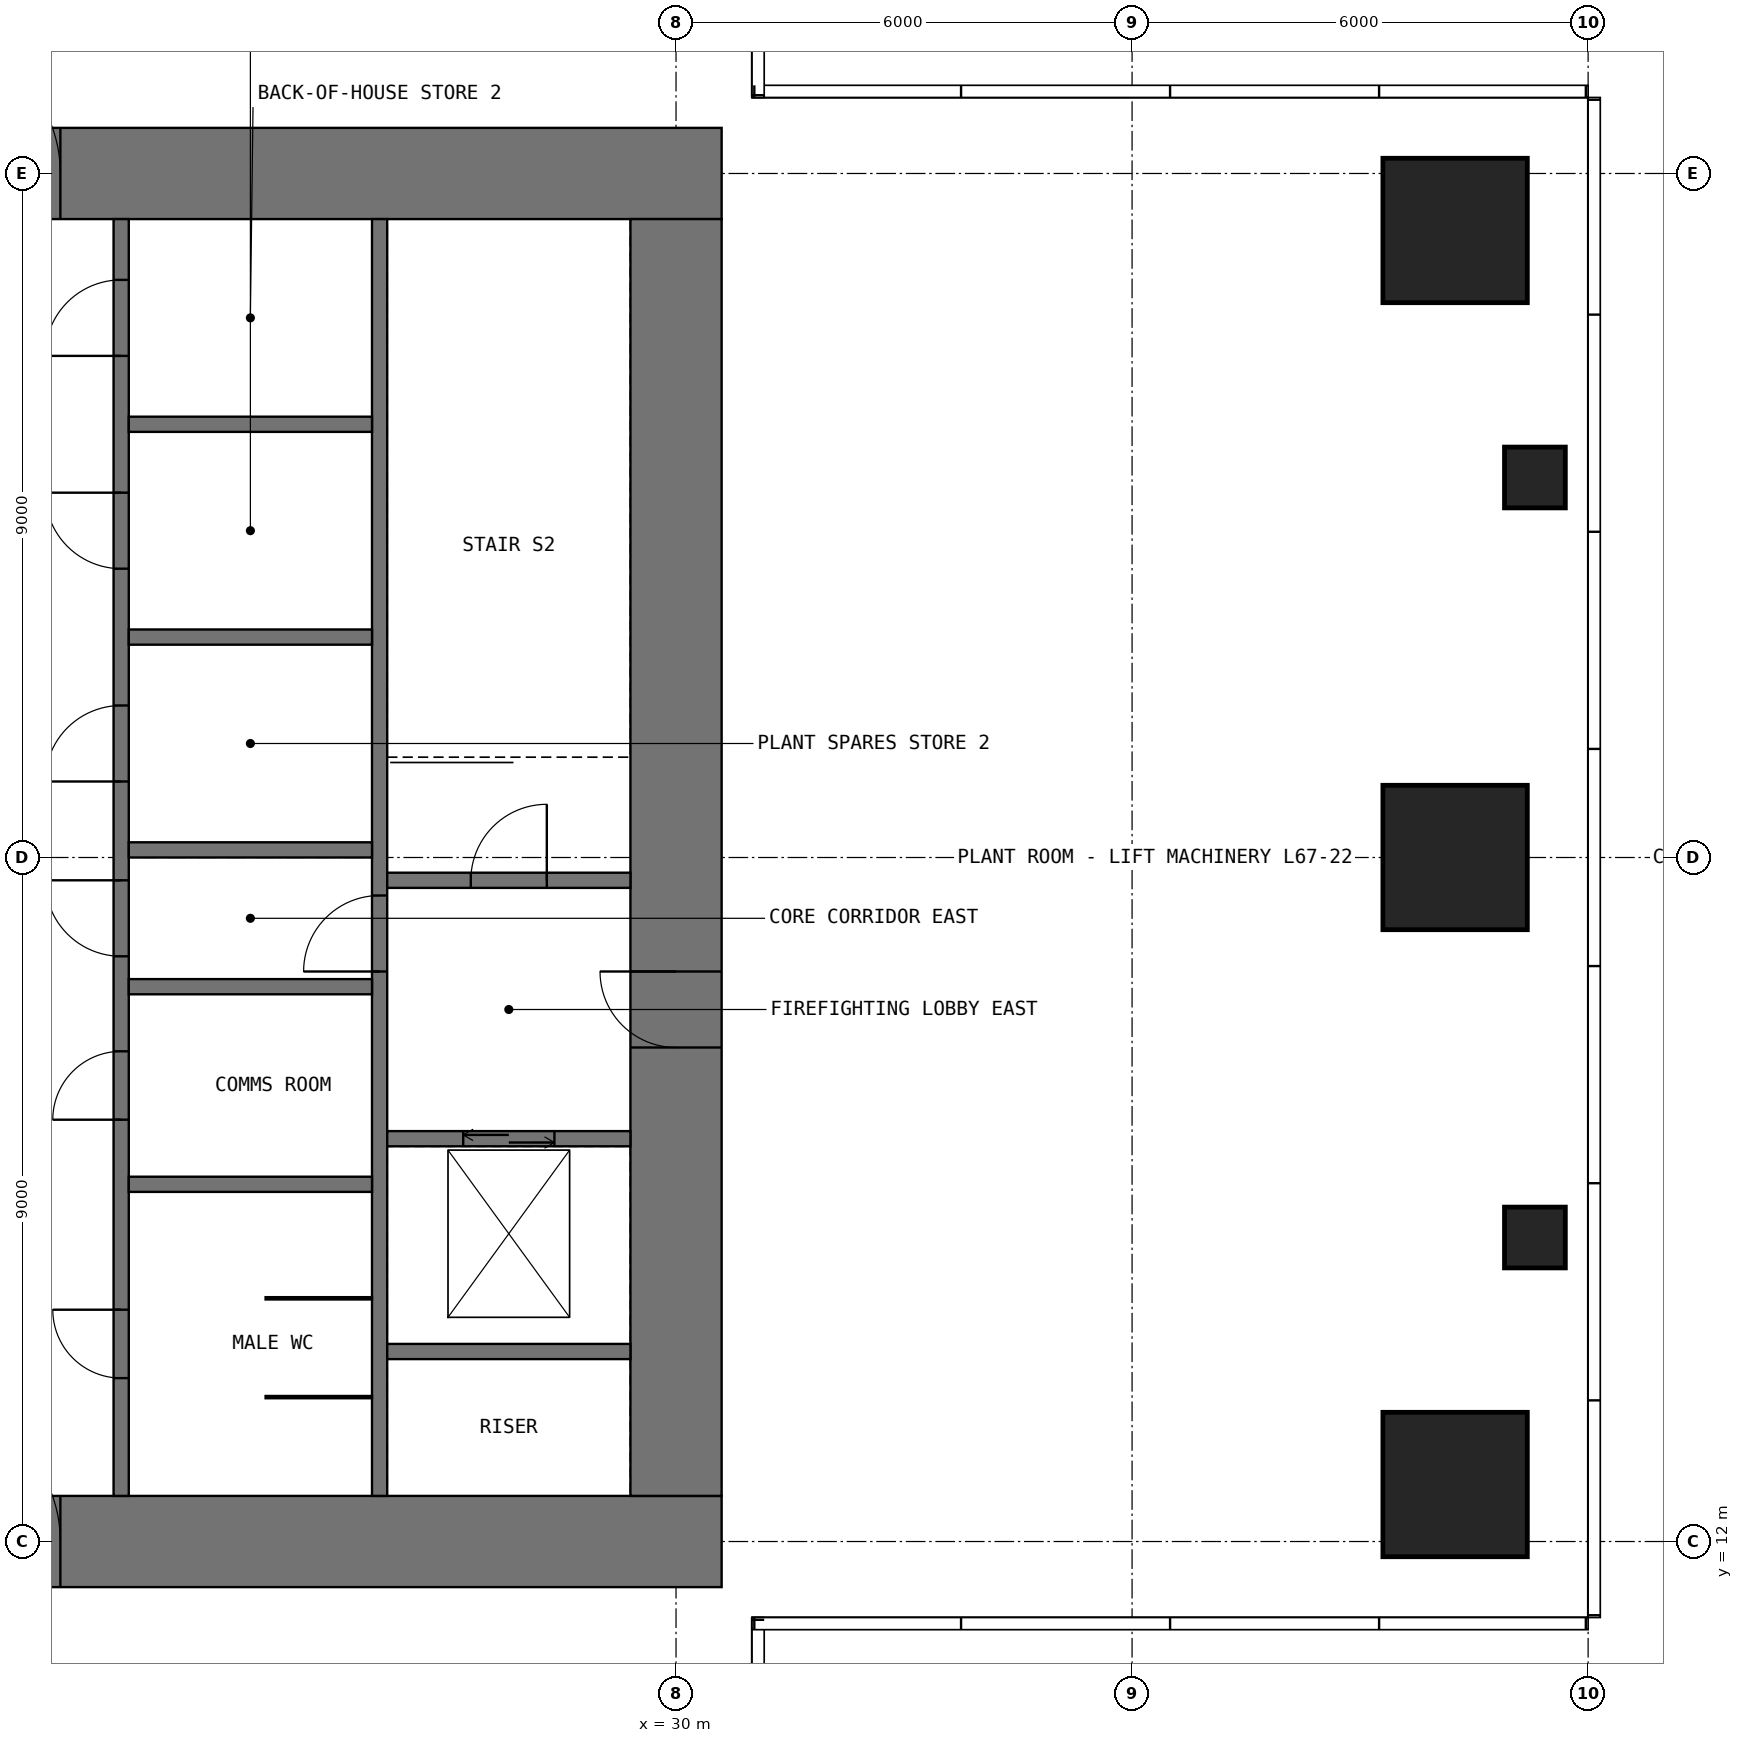
"""IFC4 building model, lengths in metres.
Left out: names, types, materials, properties, quantities, classifications, styles, units other than length and angle.
Written with IfcOpenShell. Run it as: python <this file> out.ifc"""

import sys

from ifc_helpers import new_model, si_unit, direction, frame, frame_2d, origin, origin_2d, place, context, subcontext, project, spatial, rectangle, extrude, element, fill, save


model = new_model("IFC4")
c1 = context("Model", 3, precision=1e-05, world=origin(), true_north=direction((0.0, 1.0)))
c2 = subcontext(c1, "Body", "Model", "MODEL_VIEW")
j1 = project(units=[si_unit("LENGTHUNIT", "METRE"), si_unit("PLANEANGLEUNIT", "RADIAN")], contexts=[c1])
p1 = place(None, origin())
s1 = spatial("IfcSite", under=j1, at=p1, CompositionType="ELEMENT")
p2 = place(p1, origin())
s2 = spatial("IfcBuilding", under=s1, at=p2, CompositionType="ELEMENT")
p3 = place(p2, frame((0.0, 0.0, 283.9)))
s3 = spatial("IfcBuildingStorey", under=s2, at=p3, CompositionType="ELEMENT", Elevation=283.9)
p4 = place(p3, frame((40.25, 12.75, 0.0), z_axis=(0.0, 0.0, 1.0), x_axis=(1.0, 0.0, 0.0)))
e1 = element("IfcColumn", 1, at=p4, inside=s3, PredefinedType="COLUMN", context=c2, shape_type="SweptSolid", body=[
    extrude(rectangle(XDim=1.9, YDim=1.9, at=origin_2d()), origin(), (0.0, 0.0, 1.0), 5.85),
])
p5 = place(p3, frame((41.3, 16.0, 0.0), z_axis=(0.0, 0.0, 1.0), x_axis=(1.0, 0.0, 0.0)))
e2 = element("IfcColumn", 2, at=p5, inside=s3, PredefinedType="COLUMN", context=c2, shape_type="SweptSolid", body=[
    extrude(rectangle(XDim=0.8, YDim=0.8, at=origin_2d()), origin(), (0.0, 0.0, 1.0), 5.85),
])
p6 = place(p3, frame((40.25, 21.0, 0.0), z_axis=(0.0, 0.0, 1.0), x_axis=(1.0, 0.0, 0.0)))
e3 = element("IfcColumn", 3, at=p6, inside=s3, PredefinedType="COLUMN", context=c2, shape_type="SweptSolid", body=[
    extrude(rectangle(XDim=1.9, YDim=1.9, at=origin_2d()), origin(), (0.0, 0.0, 1.0), 5.85),
])
p7 = place(p3, frame((41.3, 26.0, 0.0), z_axis=(0.0, 0.0, 1.0), x_axis=(1.0, 0.0, 0.0)))
e4 = element("IfcColumn", 4, at=p7, inside=s3, PredefinedType="COLUMN", context=c2, shape_type="SweptSolid", body=[
    extrude(rectangle(XDim=0.8, YDim=0.8, at=origin_2d()), origin(), (0.0, 0.0, 1.0), 5.85),
])
p8 = place(p3, frame((40.25, 29.25, 0.0), z_axis=(0.0, 0.0, 1.0), x_axis=(1.0, 0.0, 0.0)))
e5 = element("IfcColumn", 5, at=p8, inside=s3, PredefinedType="COLUMN", context=c2, shape_type="SweptSolid", body=[
    extrude(rectangle(XDim=1.9, YDim=1.9, at=origin_2d()), origin(), (0.0, 0.0, 1.0), 5.85),
])
p9 = place(p3, frame((11.4, 12.0, -0.1), z_axis=(0.0, 0.0, 1.0), x_axis=(1.0, 0.0, 0.0)))
e6 = element("IfcWall", 6, at=p9, inside=s3, PredefinedType="SHEAR", context=c2, shape_type="SweptSolid", body=[
    extrude(rectangle(XDim=19.2, YDim=1.2, at=frame_2d((9.6, 0.0))), origin(), (0.0, 0.0, 1.0), 5.95),
])
p10 = place(p9, frame((8.7, 0.0, 0.1)))
e7 = element("IfcOpeningElement", 7, at=p10, cuts=e6, PredefinedType="OPENING", context=c2, shape_type="SweptSolid", body=[
    extrude(rectangle(XDim=1.8, YDim=2.4, at=frame_2d((0.9, 1.2))), frame((0.0, 0.61, 0.0), z_axis=(0.0, -1.0, 0.0), x_axis=(1.0, 0.0, 0.0)), (0.0, 0.0, 1.0), 1.22),
])
p11 = place(p3, frame((11.4, 30.0, -0.1), z_axis=(0.0, 0.0, 1.0), x_axis=(1.0, 0.0, 0.0)))
e8 = element("IfcWall", 8, at=p11, inside=s3, PredefinedType="SHEAR", context=c2, shape_type="SweptSolid", body=[
    extrude(rectangle(XDim=19.2, YDim=1.2, at=frame_2d((9.6, 0.0))), origin(), (0.0, 0.0, 1.0), 5.95),
])
p12 = place(p11, frame((8.7, 0.0, 0.1)))
e9 = element("IfcOpeningElement", 9, at=p12, cuts=e8, PredefinedType="OPENING", context=c2, shape_type="SweptSolid", body=[
    extrude(rectangle(XDim=1.8, YDim=2.4, at=frame_2d((0.9, 1.2))), frame((0.0, 0.61, 0.0), z_axis=(0.0, -1.0, 0.0), x_axis=(1.0, 0.0, 0.0)), (0.0, 0.0, 1.0), 1.22),
])
p13 = place(p3, frame((30.0, 12.6, -0.1), z_axis=(0.0, 0.0, 1.0), x_axis=(0.0, 1.0, 0.0)))
e10 = element("IfcWall", 10, at=p13, inside=s3, PredefinedType="SHEAR", context=c2, shape_type="SweptSolid", body=[
    extrude(rectangle(XDim=16.8, YDim=1.2, at=frame_2d((8.4, 0.0))), origin(), (0.0, 0.0, 1.0), 5.95),
])
p14 = place(p13, frame((5.9, 0.0, 0.1)))
e11 = element("IfcOpeningElement", 11, at=p14, cuts=e10, PredefinedType="OPENING", context=c2, shape_type="SweptSolid", body=[
    extrude(rectangle(XDim=1.0, YDim=2.2, at=frame_2d((0.5, 1.1))), frame((0.0, 0.61, 0.0), z_axis=(0.0, -1.0, 0.0), x_axis=(1.0, 0.0, 0.0)), (0.0, 0.0, 1.0), 1.22),
])
p15 = place(p3, frame((22.7, 12.6, -0.1), z_axis=(0.0, 0.0, 1.0), x_axis=(0.0, 1.0, 0.0)))
e12 = element("IfcWall", 12, at=p15, inside=s3, PredefinedType="SHEAR", context=c2, shape_type="SweptSolid", body=[
    extrude(rectangle(XDim=16.8, YDim=0.2, at=frame_2d((8.4, 0.0))), origin(), (0.0, 0.0, 1.0), 5.95),
])
p16 = place(p15, frame((7.1, 0.0, 0.1)))
e13 = element("IfcOpeningElement", 13, at=p16, cuts=e12, PredefinedType="OPENING", context=c2, shape_type="SweptSolid", body=[
    extrude(rectangle(XDim=1.0, YDim=2.2, at=frame_2d((0.5, 1.1))), frame((0.0, 0.11, 0.0), z_axis=(0.0, -1.0, 0.0), x_axis=(1.0, 0.0, 0.0)), (0.0, 0.0, 1.0), 0.22),
])
p17 = place(p15, frame((1.55, 0.0, 0.1)))
e14 = element("IfcOpeningElement", 14, at=p17, cuts=e12, PredefinedType="OPENING", context=c2, shape_type="SweptSolid", body=[
    extrude(rectangle(XDim=0.9, YDim=2.2, at=frame_2d((0.45, 1.1))), frame((0.0, 0.11, 0.0), z_axis=(0.0, -1.0, 0.0), x_axis=(1.0, 0.0, 0.0)), (0.0, 0.0, 1.0), 0.22),
])
p18 = place(p15, frame((4.95, 0.0, 0.1)))
e15 = element("IfcOpeningElement", 15, at=p18, cuts=e12, PredefinedType="OPENING", context=c2, shape_type="SweptSolid", body=[
    extrude(rectangle(XDim=0.9, YDim=2.2, at=frame_2d((0.45, 1.1))), frame((0.0, 0.11, 0.0), z_axis=(0.0, -1.0, 0.0), x_axis=(1.0, 0.0, 0.0)), (0.0, 0.0, 1.0), 0.22),
])
p19 = place(p15, frame((9.4, 0.0, 0.1)))
e16 = element("IfcOpeningElement", 16, at=p19, cuts=e12, PredefinedType="OPENING", context=c2, shape_type="SweptSolid", body=[
    extrude(rectangle(XDim=1.0, YDim=2.2, at=frame_2d((0.5, 1.1))), frame((0.0, 0.11, 0.0), z_axis=(0.0, -1.0, 0.0), x_axis=(1.0, 0.0, 0.0)), (0.0, 0.0, 1.0), 0.22),
])
p20 = place(p15, frame((12.2, 0.0, 0.1)))
e17 = element("IfcOpeningElement", 17, at=p20, cuts=e12, PredefinedType="OPENING", context=c2, shape_type="SweptSolid", body=[
    extrude(rectangle(XDim=1.0, YDim=2.2, at=frame_2d((0.5, 1.1))), frame((0.0, 0.11, 0.0), z_axis=(0.0, -1.0, 0.0), x_axis=(1.0, 0.0, 0.0)), (0.0, 0.0, 1.0), 0.22),
])
p21 = place(p15, frame((15.0, 0.0, 0.1)))
e18 = element("IfcOpeningElement", 18, at=p21, cuts=e12, PredefinedType="OPENING", context=c2, shape_type="SweptSolid", body=[
    extrude(rectangle(XDim=1.0, YDim=2.2, at=frame_2d((0.5, 1.1))), frame((0.0, 0.11, 0.0), z_axis=(0.0, -1.0, 0.0), x_axis=(1.0, 0.0, 0.0)), (0.0, 0.0, 1.0), 0.22),
])
p22 = place(p3, frame((26.1, 12.6, -0.1), z_axis=(0.0, 0.0, 1.0), x_axis=(0.0, 1.0, 0.0)))
e19 = element("IfcWall", 19, at=p22, inside=s3, PredefinedType="SHEAR", context=c2, shape_type="SweptSolid", body=[
    extrude(rectangle(XDim=16.8, YDim=0.2, at=frame_2d((8.4, 0.0))), origin(), (0.0, 0.0, 1.0), 5.95),
])
p23 = place(p22, frame((6.9, 0.0, 0.1)))
e20 = element("IfcOpeningElement", 20, at=p23, cuts=e19, PredefinedType="OPENING", context=c2, shape_type="SweptSolid", body=[
    extrude(rectangle(XDim=1.0, YDim=2.2, at=frame_2d((0.5, 1.1))), frame((0.0, 0.11, 0.0), z_axis=(0.0, -1.0, 0.0), x_axis=(1.0, 0.0, 0.0)), (0.0, 0.0, 1.0), 0.22),
])
for number, where, z_axis, x_axis in (
    (21, (22.8, 16.7, -0.1), (0.0, 0.0, 1.0), (1.0, 0.0, 0.0)),
    (22, (22.8, 19.3, -0.1), (0.0, 0.0, 1.0), (1.0, 0.0, 0.0)),
    (23, (22.8, 21.1, -0.1), (0.0, 0.0, 1.0), (1.0, 0.0, 0.0)),
    (24, (22.8, 23.9, -0.1), (0.0, 0.0, 1.0), (1.0, 0.0, 0.0)),
    (25, (22.8, 26.7, -0.1), (0.0, 0.0, 1.0), (1.0, 0.0, 0.0)),
    (26, (26.2, 14.5, -0.1), (0.0, 0.0, 1.0), (1.0, 0.0, 0.0)),
):
    element("IfcWall", number, at=place(p3, frame(where, z_axis=z_axis, x_axis=x_axis)), inside=s3, PredefinedType="SHEAR", context=c2, shape_type="SweptSolid", body=[
        extrude(rectangle(XDim=3.2, YDim=0.2, at=frame_2d((1.6, 0.0))), origin(), (0.0, 0.0, 1.0), 5.95),
    ])
p24 = place(p3, frame((26.2, 17.3, -0.1), z_axis=(0.0, 0.0, 1.0), x_axis=(1.0, 0.0, 0.0)))
e27 = element("IfcWall", 27, at=p24, inside=s3, PredefinedType="SHEAR", context=c2, shape_type="SweptSolid", body=[
    extrude(rectangle(XDim=3.2, YDim=0.2, at=frame_2d((1.6, 0.0))), origin(), (0.0, 0.0, 1.0), 5.95),
])
p25 = place(p24, frame((1.0, 0.0, 0.1)))
e28 = element("IfcOpeningElement", 28, at=p25, cuts=e27, PredefinedType="OPENING", context=c2, shape_type="SweptSolid", body=[
    extrude(rectangle(XDim=1.2, YDim=2.2, at=frame_2d((0.6, 1.1))), frame((0.0, 0.11, 0.0), z_axis=(0.0, -1.0, 0.0), x_axis=(1.0, 0.0, 0.0)), (0.0, 0.0, 1.0), 0.22),
])
p26 = place(p3, frame((26.2, 20.7, -0.1), z_axis=(0.0, 0.0, 1.0), x_axis=(1.0, 0.0, 0.0)))
e29 = element("IfcWall", 29, at=p26, inside=s3, PredefinedType="SHEAR", context=c2, shape_type="SweptSolid", body=[
    extrude(rectangle(XDim=3.2, YDim=0.2, at=frame_2d((1.6, 0.0))), origin(), (0.0, 0.0, 1.0), 5.95),
])
p27 = place(p26, frame((1.1, 0.0, 0.1)))
e30 = element("IfcOpeningElement", 30, at=p27, cuts=e29, PredefinedType="OPENING", context=c2, shape_type="SweptSolid", body=[
    extrude(rectangle(XDim=1.0, YDim=2.2, at=frame_2d((0.5, 1.1))), frame((0.0, 0.11, 0.0), z_axis=(0.0, -1.0, 0.0), x_axis=(1.0, 0.0, 0.0)), (0.0, 0.0, 1.0), 0.22),
])
for number, where, z_axis, x_axis in (
    (31, (24.6, 13.9, 0.0), (0.0, 0.0, 1.0), (1.0, 0.0, 0.0)),
    (32, (24.6, 15.2, 0.0), (0.0, 0.0, 1.0), (1.0, 0.0, 0.0)),
):
    element("IfcWall", number, at=place(p3, frame(where, z_axis=z_axis, x_axis=x_axis)), inside=s3, PredefinedType="PARTITIONING", context=c2, shape_type="SweptSolid", body=[
        extrude(rectangle(XDim=1.4, YDim=0.03, at=frame_2d((0.7, 0.0))), origin(), (0.0, 0.0, 1.0), 5.65),
    ])
p28 = place(p10, origin())
e33 = element("IfcDoor", 33, at=p28, inside=s3, OperationType="DOUBLE_DOOR_SINGLE_SWING", PredefinedType="DOOR", context=c2, shape_type="SweptSolid", body=[
    extrude(rectangle(XDim=1.8, YDim=2.4, at=frame_2d((0.9, 1.2))), frame((0.0, -0.275, 0.0), z_axis=(0.0, -1.0, 0.0), x_axis=(1.0, 0.0, 0.0)), (0.0, 0.0, 1.0), 0.05),
])
fill(e7, e33)
p29 = place(p12, origin())
e34 = element("IfcDoor", 34, at=p29, inside=s3, OperationType="DOUBLE_DOOR_SINGLE_SWING", PredefinedType="DOOR", context=c2, shape_type="SweptSolid", body=[
    extrude(rectangle(XDim=1.8, YDim=2.4, at=frame_2d((0.9, 1.2))), frame((0.0, 0.325, 0.0), z_axis=(0.0, -1.0, 0.0), x_axis=(1.0, 0.0, 0.0)), (0.0, 0.0, 1.0), 0.05),
])
fill(e9, e34)
p30 = place(p14, origin())
e35 = element("IfcDoor", 35, at=p30, inside=s3, OperationType="SINGLE_SWING_RIGHT", PredefinedType="DOOR", context=c2, shape_type="SweptSolid", body=[
    extrude(rectangle(XDim=1.0, YDim=2.2, at=frame_2d((0.5, 1.1))), frame((0.0, -0.275, 0.0), z_axis=(0.0, -1.0, 0.0), x_axis=(1.0, 0.0, 0.0)), (0.0, 0.0, 1.0), 0.05),
])
fill(e11, e35)
p31 = place(p27, origin())
e36 = element("IfcDoor", 36, at=p31, inside=s3, OperationType="SINGLE_SWING_RIGHT", PredefinedType="DOOR", context=c2, shape_type="SweptSolid", body=[
    extrude(rectangle(XDim=1.0, YDim=2.2, at=frame_2d((0.5, 1.1))), frame((0.0, 0.025, 0.0), z_axis=(0.0, -1.0, 0.0), x_axis=(1.0, 0.0, 0.0)), (0.0, 0.0, 1.0), 0.05),
])
fill(e30, e36)
p32 = place(p23, origin())
e37 = element("IfcDoor", 37, at=p32, inside=s3, OperationType="SINGLE_SWING_LEFT", PredefinedType="DOOR", context=c2, shape_type="SweptSolid", body=[
    extrude(rectangle(XDim=1.0, YDim=2.2, at=frame_2d((0.5, 1.1))), frame((0.0, 0.025, 0.0), z_axis=(0.0, -1.0, 0.0), x_axis=(1.0, 0.0, 0.0)), (0.0, 0.0, 1.0), 0.05),
])
fill(e20, e37)
p33 = place(p16, origin())
e38 = element("IfcDoor", 38, at=p33, inside=s3, OperationType="SINGLE_SWING_RIGHT", PredefinedType="DOOR", context=c2, shape_type="SweptSolid", body=[
    extrude(rectangle(XDim=1.0, YDim=2.2, at=frame_2d((0.5, 1.1))), frame((0.0, 0.025, 0.0), z_axis=(0.0, -1.0, 0.0), x_axis=(1.0, 0.0, 0.0)), (0.0, 0.0, 1.0), 0.05),
])
fill(e13, e38)
p34 = place(p17, origin())
e39 = element("IfcDoor", 39, at=p34, inside=s3, OperationType="SINGLE_SWING_RIGHT", PredefinedType="DOOR", context=c2, shape_type="SweptSolid", body=[
    extrude(rectangle(XDim=0.9, YDim=2.2, at=frame_2d((0.45, 1.1))), frame((0.0, 0.025, 0.0), z_axis=(0.0, -1.0, 0.0), x_axis=(1.0, 0.0, 0.0)), (0.0, 0.0, 1.0), 0.05),
])
fill(e14, e39)
p35 = place(p18, origin())
e40 = element("IfcDoor", 40, at=p35, inside=s3, OperationType="SINGLE_SWING_LEFT", PredefinedType="DOOR", context=c2, shape_type="SweptSolid", body=[
    extrude(rectangle(XDim=0.9, YDim=2.2, at=frame_2d((0.45, 1.1))), frame((0.0, 0.025, 0.0), z_axis=(0.0, -1.0, 0.0), x_axis=(1.0, 0.0, 0.0)), (0.0, 0.0, 1.0), 0.05),
])
fill(e15, e40)
p36 = place(p19, origin())
e41 = element("IfcDoor", 41, at=p36, inside=s3, OperationType="SINGLE_SWING_LEFT", PredefinedType="DOOR", context=c2, shape_type="SweptSolid", body=[
    extrude(rectangle(XDim=1.0, YDim=2.2, at=frame_2d((0.5, 1.1))), frame((0.0, 0.025, 0.0), z_axis=(0.0, -1.0, 0.0), x_axis=(1.0, 0.0, 0.0)), (0.0, 0.0, 1.0), 0.05),
])
fill(e16, e41)
p37 = place(p20, origin())
e42 = element("IfcDoor", 42, at=p37, inside=s3, OperationType="SINGLE_SWING_RIGHT", PredefinedType="DOOR", context=c2, shape_type="SweptSolid", body=[
    extrude(rectangle(XDim=1.0, YDim=2.2, at=frame_2d((0.5, 1.1))), frame((0.0, 0.025, 0.0), z_axis=(0.0, -1.0, 0.0), x_axis=(1.0, 0.0, 0.0)), (0.0, 0.0, 1.0), 0.05),
])
fill(e17, e42)
p38 = place(p21, origin())
e43 = element("IfcDoor", 43, at=p38, inside=s3, OperationType="SINGLE_SWING_LEFT", PredefinedType="DOOR", context=c2, shape_type="SweptSolid", body=[
    extrude(rectangle(XDim=1.0, YDim=2.2, at=frame_2d((0.5, 1.1))), frame((0.0, 0.025, 0.0), z_axis=(0.0, -1.0, 0.0), x_axis=(1.0, 0.0, 0.0)), (0.0, 0.0, 1.0), 0.05),
])
fill(e18, e43)
p39 = place(p25, origin())
e44 = element("IfcDoor", 44, at=p39, inside=s3, OperationType="DOUBLE_DOOR_SLIDING", PredefinedType="DOOR", context=c2, shape_type="SweptSolid", body=[
    extrude(rectangle(XDim=1.2, YDim=2.2, at=frame_2d((0.6, 1.1))), frame((0.0, 0.025, 0.0), z_axis=(0.0, -1.0, 0.0), x_axis=(1.0, 0.0, 0.0)), (0.0, 0.0, 1.0), 0.05),
])
fill(e28, e44)
save(model, sys.argv[1])
